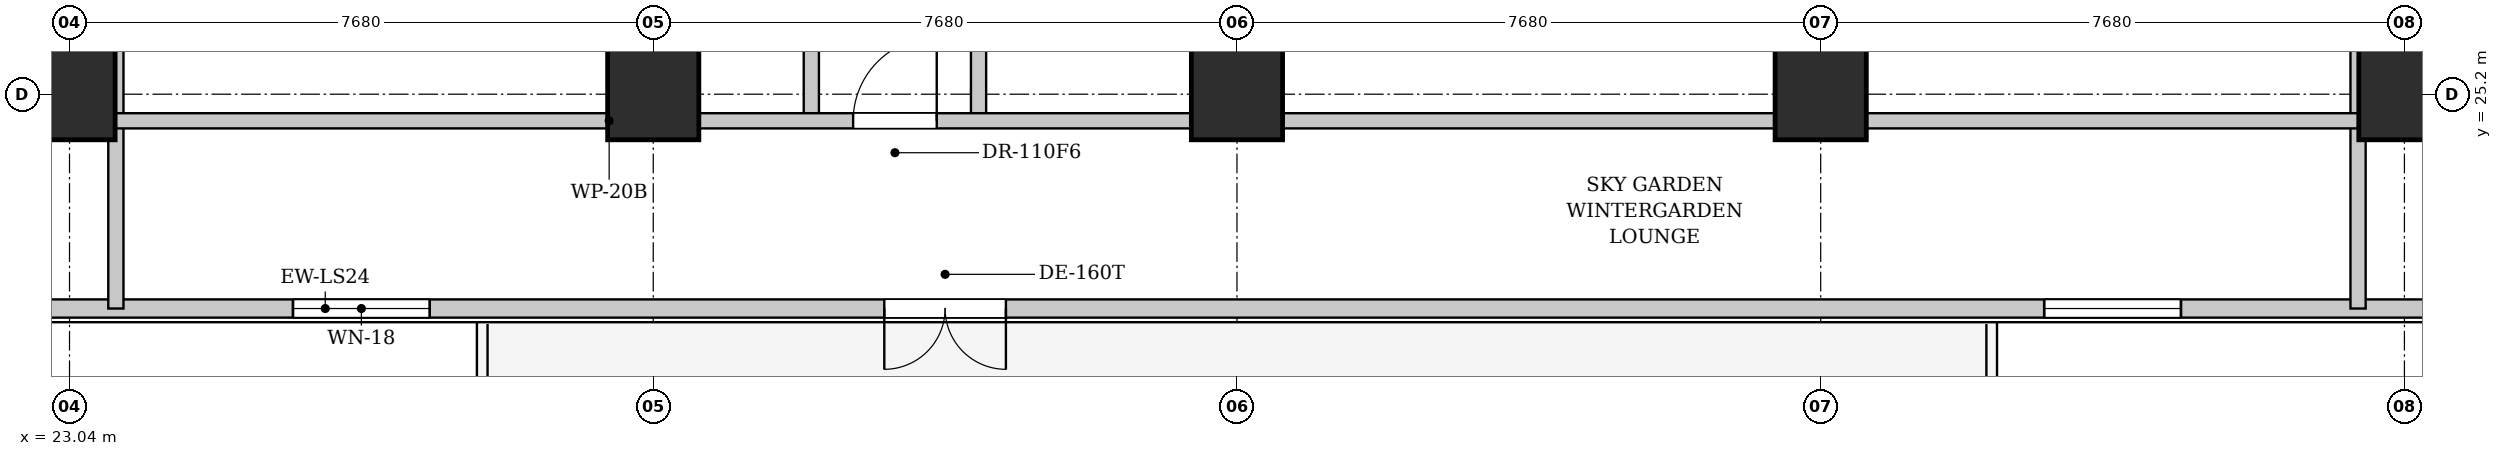
"""IFC4 building model, lengths in metres.
Left out: names, types, materials, properties, quantities, classifications, styles, units other than length and angle.
Written with IfcOpenShell. Run it as: python <this file> out.ifc"""

import sys

from ifc_helpers import new_model, si_unit, direction, frame, frame_2d, origin, origin_2d, place, context, subcontext, project, spatial, rectangle, extrude, element, fill, save


model = new_model("IFC4")
c1 = context("Model", 3, precision=1e-05, world=origin(), true_north=direction((0.0, 1.0)))
c2 = subcontext(c1, "Body", "Model", "MODEL_VIEW")
j1 = project(units=[si_unit("LENGTHUNIT", "METRE"), si_unit("PLANEANGLEUNIT", "RADIAN")], contexts=[c1])
p1 = place(None, origin())
s1 = spatial("IfcSite", under=j1, at=p1, CompositionType="ELEMENT")
p2 = place(p1, origin())
s2 = spatial("IfcBuilding", under=s1, at=p2, CompositionType="ELEMENT")
p3 = place(p2, frame((0.0, 0.0, 78.0)))
s3 = spatial("IfcBuildingStorey", under=s2, at=p3, CompositionType="ELEMENT", Elevation=78.0)
for number, where, z_axis, x_axis in (
    (1, (23.04, 25.2, 0.0), (0.0, 0.0, 1.0), (1.0, 0.0, 0.0)),
    (2, (30.72, 25.2, 0.0), (0.0, 0.0, 1.0), (1.0, 0.0, 0.0)),
    (3, (38.4, 25.2, 0.0), (0.0, 0.0, 1.0), (1.0, 0.0, 0.0)),
    (4, (46.08, 25.2, 0.0), (0.0, 0.0, 1.0), (1.0, 0.0, 0.0)),
    (5, (53.76, 25.2, 0.0), (0.0, 0.0, 1.0), (1.0, 0.0, 0.0)),
):
    element("IfcColumn", number, at=place(p3, frame(where, z_axis=z_axis, x_axis=x_axis)), inside=s3, PredefinedType="COLUMN", context=c2, shape_type="SweptSolid", body=[
        extrude(rectangle(XDim=1.2, YDim=1.2, at=origin_2d()), origin(), (0.0, 0.0, 1.0), 3.9),
    ])
p4 = place(p3, frame((16.98, 22.38, 0.0), z_axis=(0.0, 0.0, 1.0), x_axis=(1.0, 0.0, 0.0)))
e6 = element("IfcWall", 6, at=p4, inside=s3, PredefinedType="SOLIDWALL", context=c2, shape_type="SweptSolid", body=[
    extrude(rectangle(XDim=42.84, YDim=0.24, at=frame_2d((21.42, 0.0))), origin(), (0.0, 0.0, 1.0), 3.68),
])
p5 = place(p4, frame((16.78, 0.0, 0.0)))
e7 = element("IfcOpeningElement", 7, at=p5, cuts=e6, PredefinedType="OPENING", context=c2, shape_type="SweptSolid", body=[
    extrude(rectangle(XDim=1.6, YDim=2.25, at=frame_2d((0.8, 1.125))), frame((0.0, 0.13, 0.0), z_axis=(0.0, -1.0, 0.0), x_axis=(1.0, 0.0, 0.0)), (0.0, 0.0, 1.0), 0.26),
])
p6 = place(p4, frame((9.0, 0.0, 0.9)))
e8 = element("IfcOpeningElement", 8, at=p6, cuts=e6, PredefinedType="OPENING", context=c2, shape_type="SweptSolid", body=[
    extrude(rectangle(XDim=1.8, YDim=2.0, at=frame_2d((0.9, 1.0))), frame((0.0, 0.13, 0.0), z_axis=(0.0, -1.0, 0.0), x_axis=(1.0, 0.0, 0.0)), (0.0, 0.0, 1.0), 0.26),
])
p7 = place(p4, frame((32.04, 0.0, 0.9)))
e9 = element("IfcOpeningElement", 9, at=p7, cuts=e6, PredefinedType="OPENING", context=c2, shape_type="SweptSolid", body=[
    extrude(rectangle(XDim=1.8, YDim=2.0, at=frame_2d((0.9, 1.0))), frame((0.0, 0.13, 0.0), z_axis=(0.0, -1.0, 0.0), x_axis=(1.0, 0.0, 0.0)), (0.0, 0.0, 1.0), 0.26),
])
for number, where, z_axis, x_axis in (
    (10, (23.65, 22.38, 0.0), (0.0, 0.0, 1.0), (0.0, 1.0, 0.0)),
    (11, (53.15, 22.38, 0.0), (0.0, 0.0, 1.0), (0.0, 1.0, 0.0)),
):
    element("IfcWall", number, at=place(p3, frame(where, z_axis=z_axis, x_axis=x_axis)), inside=s3, PredefinedType="PARTITIONING", context=c2, shape_type="SweptSolid", body=[
        extrude(rectangle(XDim=10.42, YDim=0.2, at=frame_2d((5.21, 0.0))), origin(), (0.0, 0.0, 1.0), 3.68),
    ])
for number, where, z_axis, x_axis in (
    (12, (32.8, 24.85, 0.0), (0.0, 0.0, 1.0), (0.0, 1.0, 0.0)),
    (13, (35.0, 24.85, 0.0), (0.0, 0.0, 1.0), (0.0, 1.0, 0.0)),
):
    element("IfcWall", number, at=place(p3, frame(where, z_axis=z_axis, x_axis=x_axis)), inside=s3, PredefinedType="PARTITIONING", context=c2, shape_type="SweptSolid", body=[
        extrude(rectangle(XDim=7.95, YDim=0.2, at=frame_2d((3.975, 0.0))), origin(), (0.0, 0.0, 1.0), 3.68),
    ])
p8 = place(p3, frame((23.65, 24.85, 0.0), z_axis=(0.0, 0.0, 1.0), x_axis=(1.0, 0.0, 0.0)))
e14 = element("IfcWall", 14, at=p8, inside=s3, PredefinedType="PARTITIONING", context=c2, shape_type="SweptSolid", body=[
    extrude(rectangle(XDim=29.5, YDim=0.2, at=frame_2d((14.75, 0.0))), origin(), (0.0, 0.0, 1.0), 3.68),
])
p9 = place(p8, frame((9.7, 0.0, 0.0)))
e15 = element("IfcOpeningElement", 15, at=p9, cuts=e14, PredefinedType="OPENING", context=c2, shape_type="SweptSolid", body=[
    extrude(rectangle(XDim=1.1, YDim=2.15, at=frame_2d((0.55, 1.075))), frame((0.0, 0.11, 0.0), z_axis=(0.0, -1.0, 0.0), x_axis=(1.0, 0.0, 0.0)), (0.0, 0.0, 1.0), 0.22),
])
p10 = place(p5, frame((1.6, 0.0, 0.0), z_axis=(0.0, 0.0, 1.0), x_axis=(-1.0, 0.0, 0.0)))
e16 = element("IfcDoor", 16, at=p10, inside=s3, OperationType="SINGLE_SWING_LEFT", PredefinedType="DOOR", context=c2, shape_type="SweptSolid", body=[
    extrude(rectangle(XDim=1.6, YDim=2.25, at=frame_2d((0.8, 1.125))), frame((0.0, 0.025, 0.0), z_axis=(0.0, -1.0, 0.0), x_axis=(1.0, 0.0, 0.0)), (0.0, 0.0, 1.0), 0.05),
])
fill(e7, e16)
p11 = place(p6, origin())
e17 = element("IfcWindow", 17, at=p11, inside=s3, PartitioningType="SINGLE_PANEL", PredefinedType="WINDOW", context=c2, shape_type="SweptSolid", body=[
    extrude(rectangle(XDim=1.8, YDim=2.0, at=frame_2d((0.9, 1.0))), frame((0.0, 0.03, 0.0), z_axis=(0.0, -1.0, 0.0), x_axis=(1.0, 0.0, 0.0)), (0.0, 0.0, 1.0), 0.06),
])
fill(e8, e17)
p12 = place(p7, origin())
e18 = element("IfcWindow", 18, at=p12, inside=s3, PartitioningType="SINGLE_PANEL", PredefinedType="WINDOW", context=c2, shape_type="SweptSolid", body=[
    extrude(rectangle(XDim=1.8, YDim=2.0, at=frame_2d((0.9, 1.0))), frame((0.0, 0.03, 0.0), z_axis=(0.0, -1.0, 0.0), x_axis=(1.0, 0.0, 0.0)), (0.0, 0.0, 1.0), 0.06),
])
fill(e9, e18)
p13 = place(p9, origin())
e19 = element("IfcDoor", 19, at=p13, inside=s3, OperationType="SINGLE_SWING_RIGHT", PredefinedType="DOOR", context=c2, shape_type="SweptSolid", body=[
    extrude(rectangle(XDim=1.1, YDim=2.15, at=frame_2d((0.55, 1.075))), frame((0.0, 0.025, 0.0), z_axis=(0.0, -1.0, 0.0), x_axis=(1.0, 0.0, 0.0)), (0.0, 0.0, 1.0), 0.05),
])
fill(e15, e19)
save(model, sys.argv[1])
